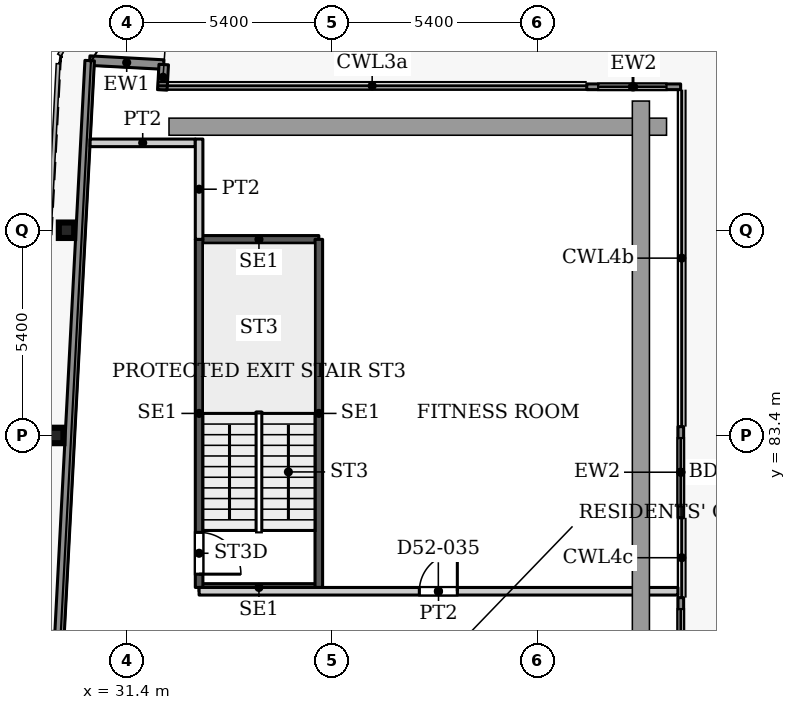
"""IFC4 building model, lengths in metres.
Left out: names, types, materials, properties, quantities, classifications, styles, units other than length and angle.
Written with IfcOpenShell. Run it as: python <this file> out.ifc"""

import sys

from ifc_helpers import new_model, si_unit, direction, frame, frame_2d, origin, origin_2d, place, context, subcontext, project, spatial, rectangle, i_section, extrude, source, transform, mapped, element, fill, save


model = new_model("IFC4")
c1 = context("Model", 3, precision=1e-05, world=origin(), true_north=direction((0.0, 1.0)))
c2 = subcontext(c1, "Body", "Model", "MODEL_VIEW")
j1 = project(units=[si_unit("LENGTHUNIT", "METRE"), si_unit("PLANEANGLEUNIT", "RADIAN")], contexts=[c1])
p1 = place(None, origin())
s1 = spatial("IfcSite", under=j1, at=p1, CompositionType="ELEMENT")
p2 = place(p1, origin())
s2 = spatial("IfcBuilding", under=s1, at=p2, CompositionType="ELEMENT")
p3 = place(p2, frame((0.0, 0.0, 227.9)))
s3 = spatial("IfcBuildingStorey", under=s2, at=p3, CompositionType="ELEMENT", Elevation=227.9)
for number, where, z_axis, x_axis in (
    (1, (29.527, 83.4, 0.0), (0.0, 0.0, 1.0), (1.0, 0.0, 0.0)),
    (2, (29.811, 88.8, 0.0), (0.0, 0.0, 1.0), (1.0, 0.0, 0.0)),
):
    element("IfcColumn", number, at=place(p3, frame(where, z_axis=z_axis, x_axis=x_axis)), inside=s3, PredefinedType="COLUMN", context=c2, shape_type="SweptSolid", body=[
        extrude(i_section(OverallWidth=0.404, OverallDepth=0.407, WebThickness=0.027, FlangeThickness=0.044, FilletRadius=0.012, at=origin_2d()), origin(), (0.0, 0.0, 1.0), 3.9),
    ])
p4 = place(p3, frame((30.421, 93.264, 0.0), z_axis=(0.0, 0.0, 1.0), x_axis=(0.998577785791, -0.053314216913, 0.0)))
e3 = element("IfcWall", 3, at=p4, inside=s3, PredefinedType="SOLIDWALL", context=c2, shape_type="SweptSolid", body=[
    extrude(rectangle(XDim=1.951, YDim=0.25, at=frame_2d((0.975, 0.0))), origin(), (0.0, 0.0, 1.0), 3.75),
])
p5 = place(p3, frame((32.369, 93.16, 0.0), z_axis=(0.0, 0.0, 1.0), x_axis=(-0.053729014033, -0.998555553312, 0.0)))
e4 = element("IfcWall", 4, at=p5, inside=s3, PredefinedType="SOLIDWALL", context=c2, shape_type="SweptSolid", body=[
    extrude(rectangle(XDim=0.668, YDim=0.25, at=frame_2d((0.334, 0.0))), origin(), (0.0, 0.0, 1.0), 3.75),
])
p6 = place(p3, frame((43.5, 92.575, 0.0), z_axis=(0.0, 0.0, 1.0), x_axis=(1.0, 0.0, 0.0)))
e5 = element("IfcWall", 5, at=p6, inside=s3, PredefinedType="SOLIDWALL", context=c2, shape_type="SweptSolid", body=[
    extrude(rectangle(XDim=2.471, YDim=0.15, at=frame_2d((1.235, 0.0))), origin(), (0.0, 0.0, 1.0), 3.75),
])
p7 = place(p6, frame((0.3, 0.0, 0.0)))
e6 = element("IfcOpeningElement", 6, at=p7, cuts=e5, PredefinedType="OPENING", context=c2, shape_type="SweptSolid", body=[
    extrude(rectangle(XDim=1.8, YDim=2.4, at=frame_2d((0.9, 1.2))), frame((0.0, 0.085, 0.0), z_axis=(0.0, -1.0, 0.0), x_axis=(1.0, 0.0, 0.0)), (0.0, 0.0, 1.0), 0.17),
])
p8 = place(p3, frame((45.975, 83.632, 0.0), z_axis=(0.0, 0.0, 1.0), x_axis=(0.0, -1.0, 0.0)))
e7 = element("IfcWall", 7, at=p8, inside=s3, PredefinedType="SOLIDWALL", context=c2, shape_type="SweptSolid", body=[
    extrude(rectangle(XDim=2.399, YDim=0.15, at=frame_2d((1.2, 0.0))), origin(), (0.0, 0.0, 1.0), 3.75),
])
p9 = place(p8, frame((0.3, 0.0, 0.0)))
e8 = element("IfcOpeningElement", 8, at=p9, cuts=e7, PredefinedType="OPENING", context=c2, shape_type="SweptSolid", body=[
    extrude(rectangle(XDim=1.8, YDim=2.4, at=frame_2d((0.9, 1.2))), frame((0.0, 0.085, 0.0), z_axis=(0.0, -1.0, 0.0), x_axis=(1.0, 0.0, 0.0)), (0.0, 0.0, 1.0), 0.17),
])
p10 = place(p3, frame((45.975, 79.132, 0.0), z_axis=(0.0, 0.0, 1.0), x_axis=(0.0, -1.0, 0.0)))
e9 = element("IfcWall", 9, at=p10, inside=s3, PredefinedType="SOLIDWALL", context=c2, shape_type="SweptSolid", body=[
    extrude(rectangle(XDim=2.399, YDim=0.15, at=frame_2d((1.2, 0.0))), origin(), (0.0, 0.0, 1.0), 3.75),
])
p11 = place(p10, frame((0.3, 0.0, 0.0)))
e10 = element("IfcOpeningElement", 10, at=p11, cuts=e9, PredefinedType="OPENING", context=c2, shape_type="SweptSolid", body=[
    extrude(rectangle(XDim=1.8, YDim=2.4, at=frame_2d((0.9, 1.2))), frame((0.0, 0.085, 0.0), z_axis=(0.0, -1.0, 0.0), x_axis=(1.0, 0.0, 0.0)), (0.0, 0.0, 1.0), 0.17),
])
p12 = place(p3, frame((27.195, 31.969, 0.0), z_axis=(0.0, 0.0, 1.0), x_axis=(0.052555284099, 0.998618016117, 0.0)))
e11 = element("IfcWall", 11, at=p12, inside=s3, PredefinedType="SOLIDWALL", context=c2, shape_type="SweptSolid", body=[
    extrude(rectangle(XDim=61.38, YDim=0.25, at=frame_2d((30.69, 0.0))), origin(), (0.0, 0.0, 1.0), 3.75),
])
for number, where, z_axis, x_axis in (
    (12, (33.3, 79.4, 0.0), (0.0, 0.0, 1.0), (1.0, 0.0, 0.0)),
    (13, (33.3, 88.56, 0.0), (0.0, 0.0, 1.0), (1.0, 0.0, 0.0)),
):
    element("IfcWall", number, at=place(p3, frame(where, z_axis=z_axis, x_axis=x_axis)), inside=s3, PredefinedType="SHEAR", context=c2, shape_type="SweptSolid", body=[
        extrude(rectangle(XDim=3.15, YDim=0.2, at=frame_2d((1.575, 0.0))), origin(), (0.0, 0.0, 1.0), 3.9),
    ])
p13 = place(p3, frame((33.3, 79.4, 0.0), z_axis=(0.0, 0.0, 1.0), x_axis=(0.0, 1.0, 0.0)))
e14 = element("IfcWall", 14, at=p13, inside=s3, PredefinedType="SHEAR", context=c2, shape_type="SweptSolid", body=[
    extrude(rectangle(XDim=9.16, YDim=0.2, at=frame_2d((4.58, 0.0))), origin(), (0.0, 0.0, 1.0), 3.9),
])
p14 = place(p13, frame((0.35, 0.0, 0.0)))
e15 = element("IfcOpeningElement", 15, at=p14, cuts=e14, PredefinedType="OPENING", context=c2, shape_type="SweptSolid", body=[
    extrude(rectangle(XDim=1.1, YDim=2.2, at=frame_2d((0.55, 1.1))), frame((0.0, 0.11, 0.0), z_axis=(0.0, -1.0, 0.0), x_axis=(1.0, 0.0, 0.0)), (0.0, 0.0, 1.0), 0.22),
])
p15 = place(p3, frame((36.45, 79.4, 0.0), z_axis=(0.0, 0.0, 1.0), x_axis=(0.0, 1.0, 0.0)))
e16 = element("IfcWall", 16, at=p15, inside=s3, PredefinedType="SHEAR", context=c2, shape_type="SweptSolid", body=[
    extrude(rectangle(XDim=9.16, YDim=0.2, at=frame_2d((4.58, 0.0))), origin(), (0.0, 0.0, 1.0), 3.9),
])
p16 = place(p3, frame((30.432, 91.1, 0.0), z_axis=(0.0, 0.0, 1.0), x_axis=(1.0, 0.0, 0.0)))
e17 = element("IfcWall", 17, at=p16, inside=s3, PredefinedType="PARTITIONING", context=c2, shape_type="SweptSolid", body=[
    extrude(rectangle(XDim=2.768, YDim=0.2, at=frame_2d((1.384, 0.0))), origin(), (0.0, 0.0, 1.0), 3.6),
])
p17 = place(p3, frame((33.3, 79.3, 0.0), z_axis=(0.0, 0.0, 1.0), x_axis=(1.0, 0.0, 0.0)))
e18 = element("IfcWall", 18, at=p17, inside=s3, PredefinedType="PARTITIONING", context=c2, shape_type="SweptSolid", body=[
    extrude(rectangle(XDim=12.6, YDim=0.2, at=frame_2d((6.3, 0.0))), origin(), (0.0, 0.0, 1.0), 3.6),
])
p18 = place(p17, frame((5.795, 0.0, 0.0)))
e19 = element("IfcOpeningElement", 19, at=p18, cuts=e18, PredefinedType="OPENING", context=c2, shape_type="SweptSolid", body=[
    extrude(rectangle(XDim=1.0, YDim=2.1, at=frame_2d((0.5, 1.05))), frame((0.0, 0.11, 0.0), z_axis=(0.0, -1.0, 0.0), x_axis=(1.0, 0.0, 0.0)), (0.0, 0.0, 1.0), 0.22),
])
p19 = place(p3, frame((33.3, 88.56, 0.0), z_axis=(0.0, 0.0, 1.0), x_axis=(0.0, 1.0, 0.0)))
e20 = element("IfcWall", 20, at=p19, inside=s3, PredefinedType="PARTITIONING", context=c2, shape_type="SweptSolid", body=[
    extrude(rectangle(XDim=2.64, YDim=0.2, at=frame_2d((1.32, 0.0))), origin(), (0.0, 0.0, 1.0), 3.6),
])
m1 = source(origin(), c2, "Body", "SweptSolid", [
    extrude(rectangle(XDim=1.8, YDim=2.4, at=frame_2d((0.9, 1.2))), frame((0.0, 0.025, 0.0), z_axis=(0.0, -1.0, 0.0), x_axis=(1.0, 0.0, 0.0)), (0.0, 0.0, 1.0), 0.05),
])
p20 = place(p7, origin())
e21 = element("IfcDoor", 21, at=p20, inside=s3, OperationType="SLIDING_TO_LEFT", PredefinedType="DOOR", context=c2, shape_type="MappedRepresentation", body=[
    mapped(m1, transform((0.0, 0.0, 0.0), x_axis=(1.0, 0.0, 0.0), y_axis=(0.0, 1.0, 0.0), z_axis=(0.0, 0.0, 1.0), scale=1.0)),
])
fill(e6, e21)
p21 = place(p9, origin())
e22 = element("IfcDoor", 22, at=p21, inside=s3, OperationType="SLIDING_TO_LEFT", PredefinedType="DOOR", context=c2, shape_type="MappedRepresentation", body=[
    mapped(m1, transform((0.0, 0.0, 0.0), x_axis=(1.0, 0.0, 0.0), y_axis=(0.0, 1.0, 0.0), z_axis=(0.0, 0.0, 1.0), scale=1.0)),
])
fill(e8, e22)
p22 = place(p11, origin())
e23 = element("IfcDoor", 23, at=p22, inside=s3, OperationType="SLIDING_TO_LEFT", PredefinedType="DOOR", context=c2, shape_type="MappedRepresentation", body=[
    mapped(m1, transform((0.0, 0.0, 0.0), x_axis=(1.0, 0.0, 0.0), y_axis=(0.0, 1.0, 0.0), z_axis=(0.0, 0.0, 1.0), scale=1.0)),
])
fill(e10, e23)
m2 = source(origin(), c2, "Body", "SweptSolid", [
    extrude(rectangle(XDim=1.1, YDim=2.2, at=frame_2d((0.55, 1.1))), frame((0.0, 0.025, 0.0), z_axis=(0.0, -1.0, 0.0), x_axis=(1.0, 0.0, 0.0)), (0.0, 0.0, 1.0), 0.05),
])
p23 = place(p14, origin())
e24 = element("IfcDoor", 24, at=p23, inside=s3, OperationType="SINGLE_SWING_RIGHT", PredefinedType="DOOR", context=c2, shape_type="MappedRepresentation", body=[
    mapped(m2, transform((0.0, 0.0, 0.0), x_axis=(1.0, 0.0, 0.0), y_axis=(0.0, 1.0, 0.0), z_axis=(0.0, 0.0, 1.0), scale=1.0)),
])
fill(e15, e24)
m3 = source(origin(), c2, "Body", "SweptSolid", [
    extrude(rectangle(XDim=1.0, YDim=2.1, at=frame_2d((0.5, 1.05))), frame((0.0, 0.025, 0.0), z_axis=(0.0, -1.0, 0.0), x_axis=(1.0, 0.0, 0.0)), (0.0, 0.0, 1.0), 0.05),
])
p24 = place(p18, origin())
e25 = element("IfcDoor", 25, at=p24, inside=s3, OperationType="SINGLE_SWING_LEFT", PredefinedType="DOOR", context=c2, shape_type="MappedRepresentation", body=[
    mapped(m3, transform((0.0, 0.0, 0.0), x_axis=(1.0, 0.0, 0.0), y_axis=(0.0, 1.0, 0.0), z_axis=(0.0, 0.0, 1.0), scale=1.0)),
])
fill(e19, e25)
save(model, sys.argv[1])
